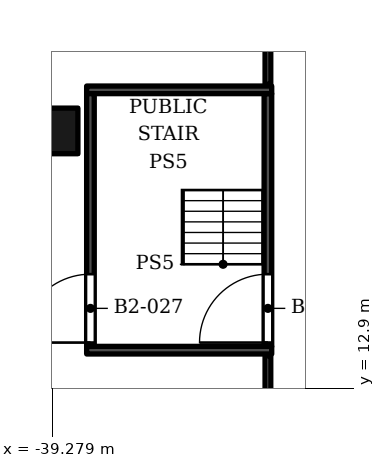
"""IFC4 building model, lengths in metres.
Left out: names, types, materials, properties, quantities, classifications, styles, units other than length and angle.
Written with IfcOpenShell. Run it as: python <this file> out.ifc"""

import sys

from ifc_helpers import new_model, si_unit, direction, frame, frame_2d, origin, origin_2d, place, context, subcontext, project, spatial, rectangle, extrude, element, fill, save


model = new_model("IFC4")
c1 = context("Model", 3, precision=1e-05, world=origin(), true_north=direction((0.0, 1.0)))
c2 = subcontext(c1, "Body", "Model", "MODEL_VIEW")
j1 = project(units=[si_unit("LENGTHUNIT", "METRE"), si_unit("PLANEANGLEUNIT", "RADIAN")], contexts=[c1])
p1 = place(None, origin())
s1 = spatial("IfcSite", under=j1, at=p1, CompositionType="ELEMENT")
p2 = place(p1, origin())
s2 = spatial("IfcBuilding", under=s1, at=p2, CompositionType="ELEMENT")
p3 = place(p2, frame((0.0, 0.0, -10.0)))
s3 = spatial("IfcBuildingStorey", under=s2, at=p3, CompositionType="ELEMENT", Elevation=-10.0)
p4 = place(p3, frame((-39.2, 19.669, -1.6), z_axis=(0.0, 0.0, 1.0), x_axis=(1.0, 0.0, 0.0)))
e1 = element("IfcColumn", 1, at=p4, inside=s3, PredefinedType="COLUMN", context=c2, shape_type="SweptSolid", body=[
    extrude(rectangle(XDim=1.2, YDim=1.2, at=origin_2d()), origin(), (0.0, 0.0, 1.0), 6.6),
])
for number, where, z_axis, x_axis in (
    (2, (-38.37, 13.9, 0.0), (0.0, 0.0, 1.0), (1.0, 0.0, 0.0)),
    (3, (-38.37, 20.75, 0.0), (0.0, 0.0, 1.0), (1.0, 0.0, 0.0)),
):
    element("IfcWall", number, at=place(p3, frame(where, z_axis=z_axis, x_axis=x_axis)), inside=s3, PredefinedType="SOLIDWALL", context=c2, shape_type="SweptSolid", body=[
        extrude(rectangle(XDim=4.87, YDim=0.2, at=frame_2d((2.435, 0.0))), origin(), (0.0, 0.0, 1.0), 4.5),
    ])
p5 = place(p3, frame((-38.27, 14.0, 0.0), z_axis=(0.0, 0.0, 1.0), x_axis=(0.0, 1.0, 0.0)))
e4 = element("IfcWall", 4, at=p5, inside=s3, PredefinedType="SOLIDWALL", context=c2, shape_type="SweptSolid", body=[
    extrude(rectangle(XDim=6.65, YDim=0.2, at=frame_2d((3.325, 0.0))), origin(), (0.0, 0.0, 1.0), 4.5),
])
p6 = place(p5, frame((0.1, 0.0, 0.0)))
e5 = element("IfcOpeningElement", 5, at=p6, cuts=e4, PredefinedType="OPENING", context=c2, shape_type="SweptSolid", body=[
    extrude(rectangle(XDim=1.8, YDim=2.4, at=frame_2d((0.9, 1.2))), frame((0.0, 0.11, 0.0), z_axis=(0.0, -1.0, 0.0), x_axis=(1.0, 0.0, 0.0)), (0.0, 0.0, 1.0), 0.22),
])
p7 = place(p3, frame((-33.6, 14.0, 0.0), z_axis=(0.0, 0.0, 1.0), x_axis=(0.0, 1.0, 0.0)))
e6 = element("IfcWall", 6, at=p7, inside=s3, PredefinedType="SOLIDWALL", context=c2, shape_type="SweptSolid", body=[
    extrude(rectangle(XDim=6.65, YDim=0.2, at=frame_2d((3.325, 0.0))), origin(), (0.0, 0.0, 1.0), 4.5),
])
p8 = place(p7, frame((0.1, 0.0, 0.0)))
e7 = element("IfcOpeningElement", 7, at=p8, cuts=e6, PredefinedType="OPENING", context=c2, shape_type="SweptSolid", body=[
    extrude(rectangle(XDim=1.8, YDim=2.4, at=frame_2d((0.9, 1.2))), frame((0.0, 0.11, 0.0), z_axis=(0.0, -1.0, 0.0), x_axis=(1.0, 0.0, 0.0)), (0.0, 0.0, 1.0), 0.22),
])
p9 = place(p3, frame((-33.6, 4.69, 0.0), z_axis=(0.0, 0.0, 1.0), x_axis=(0.0, 1.0, 0.0)))
e8 = element("IfcWall", 8, at=p9, inside=s3, PredefinedType="PARTITIONING", context=c2, shape_type="SweptSolid", body=[
    extrude(rectangle(XDim=9.07, YDim=0.15, at=frame_2d((4.535, 0.0))), origin(), (0.0, 0.0, 1.0), 3.3),
])
p10 = place(p9, frame((5.885, 0.0, 0.0)))
e9 = element("IfcOpeningElement", 9, at=p10, cuts=e8, PredefinedType="OPENING", context=c2, shape_type="SweptSolid", body=[
    extrude(rectangle(XDim=1.0, YDim=2.1, at=frame_2d((0.5, 1.05))), frame((0.0, 0.085, 0.0), z_axis=(0.0, -1.0, 0.0), x_axis=(1.0, 0.0, 0.0)), (0.0, 0.0, 1.0), 0.17),
])
p11 = place(p3, frame((-33.6, 20.89, 0.0), z_axis=(0.0, 0.0, 1.0), x_axis=(0.0, 1.0, 0.0)))
e10 = element("IfcWall", 10, at=p11, inside=s3, PredefinedType="PARTITIONING", context=c2, shape_type="SweptSolid", body=[
    extrude(rectangle(XDim=3.885, YDim=0.15, at=frame_2d((1.942, 0.0))), origin(), (0.0, 0.0, 1.0), 4.5),
])
p12 = place(p8, origin())
e11 = element("IfcDoor", 11, at=p12, inside=s3, OperationType="DOUBLE_DOOR_SINGLE_SWING", PredefinedType="DOOR", context=c2, shape_type="SweptSolid", body=[
    extrude(rectangle(XDim=1.8, YDim=2.4, at=frame_2d((0.9, 1.2))), frame((0.0, 0.025, 0.0), z_axis=(0.0, -1.0, 0.0), x_axis=(1.0, 0.0, 0.0)), (0.0, 0.0, 1.0), 0.05),
])
fill(e7, e11)
p13 = place(p6, origin())
e12 = element("IfcDoor", 12, at=p13, inside=s3, OperationType="DOUBLE_DOOR_SINGLE_SWING", PredefinedType="DOOR", context=c2, shape_type="SweptSolid", body=[
    extrude(rectangle(XDim=1.8, YDim=2.4, at=frame_2d((0.9, 1.2))), frame((0.0, 0.025, 0.0), z_axis=(0.0, -1.0, 0.0), x_axis=(1.0, 0.0, 0.0)), (0.0, 0.0, 1.0), 0.05),
])
fill(e5, e12)
save(model, sys.argv[1])
